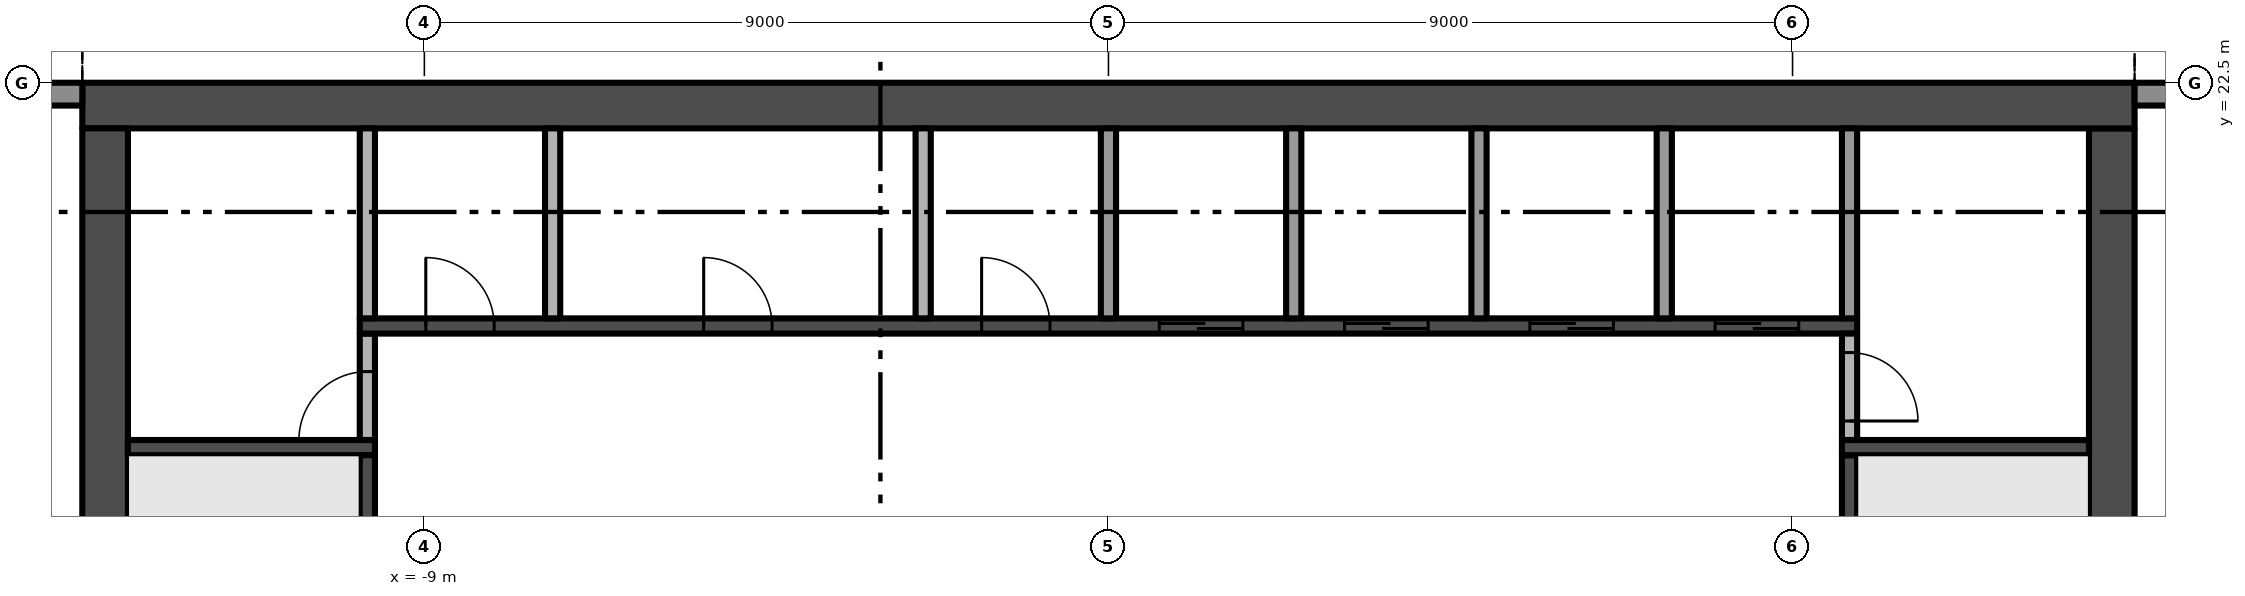
"""IFC4 building model, lengths in metres.
Left out: names, types, materials, properties, quantities, classifications, styles, units other than length and angle.
Written with IfcOpenShell. Run it as: python <this file> out.ifc"""

import sys

from ifc_helpers import new_model, si_unit, direction, frame, frame_2d, origin, place, context, subcontext, project, spatial, polyline, rectangle, outline, extrude, element, fill, save


model = new_model("IFC4")
c1 = context("Model", 3, precision=1e-05, world=origin(), true_north=direction((0.0, 1.0)))
c2 = subcontext(c1, "Body", "Model", "MODEL_VIEW")
j1 = project(units=[si_unit("LENGTHUNIT", "METRE"), si_unit("PLANEANGLEUNIT", "RADIAN")], contexts=[c1])
p1 = place(None, origin())
s1 = spatial("IfcSite", under=j1, at=p1, CompositionType="ELEMENT")
p2 = place(p1, origin())
s2 = spatial("IfcBuilding", under=s1, at=p2, CompositionType="ELEMENT")
p3 = place(p2, frame((0.0, 0.0, 222.4)))
s3 = spatial("IfcBuildingStorey", under=s2, at=p3, CompositionType="ELEMENT", Elevation=222.4)
p4 = place(p3, frame((13.2, 5.1, -0.3), z_axis=(0.0, 0.0, 1.0), x_axis=(0.0, 1.0, 0.0)))
e1 = element("IfcWall", 1, at=p4, inside=s3, PredefinedType="SHEAR", context=c2, shape_type="SweptSolid", body=[
    extrude(rectangle(XDim=16.8, YDim=0.6, at=frame_2d((8.4, 0.0))), origin(), (0.0, 0.0, 1.0), 3.8),
])
p5 = place(p4, frame((6.3, 0.0, 0.3)))
e2 = element("IfcOpeningElement", 2, at=p5, cuts=e1, PredefinedType="OPENING", context=c2, shape_type="SweptSolid", body=[
    extrude(rectangle(XDim=1.2, YDim=2.2, at=frame_2d((0.6, 1.1))), frame((0.0, 0.31, 0.0), z_axis=(0.0, -1.0, 0.0), x_axis=(1.0, 0.0, 0.0)), (0.0, 0.0, 1.0), 0.62),
])
p6 = place(p3, frame((13.5, 22.2, -0.3), z_axis=(0.0, 0.0, 1.0), x_axis=(-1.0, 0.0, 0.0)))
e3 = element("IfcWall", 3, at=p6, inside=s3, PredefinedType="SHEAR", context=c2, shape_type="SweptSolid", body=[
    extrude(rectangle(XDim=27.0, YDim=0.6, at=frame_2d((13.5, 0.0))), origin(), (0.0, 0.0, 1.0), 3.8),
])
p7 = place(p3, frame((-13.2, 21.9, -0.3), z_axis=(0.0, 0.0, 1.0), x_axis=(0.0, -1.0, 0.0)))
e4 = element("IfcWall", 4, at=p7, inside=s3, PredefinedType="SHEAR", context=c2, shape_type="SweptSolid", body=[
    extrude(rectangle(XDim=16.8, YDim=0.6, at=frame_2d((8.4, 0.0))), origin(), (0.0, 0.0, 1.0), 3.8),
])
p8 = place(p7, frame((9.3, 0.0, 0.3)))
e5 = element("IfcOpeningElement", 5, at=p8, cuts=e4, PredefinedType="OPENING", context=c2, shape_type="SweptSolid", body=[
    extrude(rectangle(XDim=1.2, YDim=2.2, at=frame_2d((0.6, 1.1))), frame((0.0, 0.31, 0.0), z_axis=(0.0, -1.0, 0.0), x_axis=(1.0, 0.0, 0.0)), (0.0, 0.0, 1.0), 0.62),
])
p9 = place(p3, frame((13.5, 22.35, 0.0), z_axis=(0.0, 0.0, 1.0), x_axis=(1.0, 0.0, 0.0)))
e6 = element("IfcWall", 6, at=p9, inside=s3, PredefinedType="SOLIDWALL", context=c2, shape_type="SweptSolid", body=[
    extrude(rectangle(XDim=4.025, YDim=0.3, at=frame_2d((2.013, 0.0))), origin(), (0.0, 0.0, 1.0), 3.5),
])
p10 = place(p9, frame((0.625, 0.0, 0.45)))
e7 = element("IfcOpeningElement", 7, at=p10, cuts=e6, PredefinedType="OPENING", context=c2, shape_type="SweptSolid", body=[
    extrude(rectangle(XDim=3.075, YDim=2.65, at=frame_2d((1.538, 1.325))), frame((0.0, 0.16, 0.0), z_axis=(0.0, -1.0, 0.0), x_axis=(1.0, 0.0, 0.0)), (0.0, 0.0, 1.0), 0.32),
])
p11 = place(p3, frame((-17.525, 22.35, 0.0), z_axis=(0.0, 0.0, 1.0), x_axis=(1.0, 0.0, 0.0)))
e8 = element("IfcWall", 8, at=p11, inside=s3, PredefinedType="SOLIDWALL", context=c2, shape_type="SweptSolid", body=[
    extrude(rectangle(XDim=4.025, YDim=0.3, at=frame_2d((2.013, 0.0))), origin(), (0.0, 0.0, 1.0), 3.5),
])
p12 = place(p11, frame((1.0, 0.0, 0.0)))
e9 = element("IfcOpeningElement", 9, at=p12, cuts=e8, PredefinedType="OPENING", context=c2, shape_type="SweptSolid", body=[
    extrude(rectangle(XDim=2.4, YDim=2.4, at=frame_2d((1.2, 1.2))), frame((0.0, 0.16, 0.0), z_axis=(0.0, -1.0, 0.0), x_axis=(1.0, 0.0, 0.0)), (0.0, 0.0, 1.0), 0.32),
])
p13 = place(p3, origin())
e10 = element("IfcWall", 10, at=p13, inside=s3, PredefinedType="USERDEFINED", context=c2, shape_type="SweptSolid", body=[
    extrude(outline(polyline([(22.5, 25.149), (21.0, 24.488), (19.5, 23.755), (18.0, 23.231), (16.875, 23.1), (16.5, 23.115), (15.0, 23.451), (13.5, 24.112), (13.399, 23.883), (14.921, 23.213), (16.467, 22.866), (16.885, 22.849), (18.056, 22.986), (19.596, 23.524), (21.105, 24.261), (22.601, 24.92), (22.5, 25.149)])), origin(), (0.0, 0.0, 1.0), 0.9),
])
p14 = place(p3, origin())
e11 = element("IfcWall", 11, at=p14, inside=s3, PredefinedType="USERDEFINED", context=c2, shape_type="SweptSolid", body=[
    extrude(outline(polyline([(-13.5, 25.149), (-15.0, 24.488), (-16.5, 23.755), (-18.0, 23.231), (-19.125, 23.1), (-19.5, 23.115), (-21.0, 23.451), (-22.5, 24.112), (-22.601, 23.883), (-21.079, 23.213), (-19.533, 22.866), (-19.115, 22.849), (-17.944, 22.986), (-16.404, 23.524), (-14.895, 24.261), (-13.399, 24.92), (-13.5, 25.149)])), origin(), (0.0, 0.0, 1.0), 0.9),
])
p15 = place(p3, frame((-12.9, 17.7, 0.0), z_axis=(0.0, 0.0, 1.0), x_axis=(1.0, 0.0, 0.0)))
e12 = element("IfcWall", 12, at=p15, inside=s3, PredefinedType="SHEAR", context=c2, shape_type="SweptSolid", body=[
    extrude(rectangle(XDim=3.25, YDim=0.2, at=frame_2d((1.625, 0.0))), origin(), (0.0, 0.0, 1.0), 3.5),
])
p16 = place(p3, frame((-9.75, 16.1, 0.0), z_axis=(0.0, 0.0, 1.0), x_axis=(0.0, 1.0, 0.0)))
e13 = element("IfcWall", 13, at=p16, inside=s3, PredefinedType="SHEAR", context=c2, shape_type="SweptSolid", body=[
    extrude(rectangle(XDim=1.5, YDim=0.2, at=frame_2d((0.75, 0.0))), origin(), (0.0, 0.0, 1.0), 3.5),
])
p17 = place(p3, frame((-9.75, 17.8, 0.0), z_axis=(0.0, 0.0, 1.0), x_axis=(0.0, 1.0, 0.0)))
e14 = element("IfcWall", 14, at=p17, inside=s3, PredefinedType="PARTITIONING", context=c2, shape_type="SweptSolid", body=[
    extrude(rectangle(XDim=1.4, YDim=0.2, at=frame_2d((0.7, 0.0))), origin(), (0.0, 0.0, 1.0), 3.5),
])
p18 = place(p17, origin())
e15 = element("IfcOpeningElement", 15, at=p18, cuts=e14, PredefinedType="OPENING", context=c2, shape_type="SweptSolid", body=[
    extrude(rectangle(XDim=0.9, YDim=2.1, at=frame_2d((0.45, 1.05))), frame((0.0, 0.11, 0.0), z_axis=(0.0, -1.0, 0.0), x_axis=(1.0, 0.0, 0.0)), (0.0, 0.0, 1.0), 0.22),
])
p19 = place(p3, frame((-9.85, 19.3, 0.0), z_axis=(0.0, 0.0, 1.0), x_axis=(1.0, 0.0, 0.0)))
e16 = element("IfcWall", 16, at=p19, inside=s3, PredefinedType="SHEAR", context=c2, shape_type="SweptSolid", body=[
    extrude(rectangle(XDim=19.7, YDim=0.2, at=frame_2d((9.85, 0.0))), origin(), (0.0, 0.0, 1.0), 3.5),
])
p20 = place(p19, frame((10.519, 0.0, 0.0)))
e17 = element("IfcOpeningElement", 17, at=p20, cuts=e16, PredefinedType="OPENING", context=c2, shape_type="SweptSolid", body=[
    extrude(rectangle(XDim=1.1, YDim=2.1, at=frame_2d((0.55, 1.05))), frame((0.0, 0.11, 0.0), z_axis=(0.0, -1.0, 0.0), x_axis=(1.0, 0.0, 0.0)), (0.0, 0.0, 1.0), 0.22),
])
p21 = place(p19, frame((12.956, 0.0, 0.0)))
e18 = element("IfcOpeningElement", 18, at=p21, cuts=e16, PredefinedType="OPENING", context=c2, shape_type="SweptSolid", body=[
    extrude(rectangle(XDim=1.1, YDim=2.1, at=frame_2d((0.55, 1.05))), frame((0.0, 0.11, 0.0), z_axis=(0.0, -1.0, 0.0), x_axis=(1.0, 0.0, 0.0)), (0.0, 0.0, 1.0), 0.22),
])
p22 = place(p19, frame((15.394, 0.0, 0.0)))
e19 = element("IfcOpeningElement", 19, at=p22, cuts=e16, PredefinedType="OPENING", context=c2, shape_type="SweptSolid", body=[
    extrude(rectangle(XDim=1.1, YDim=2.1, at=frame_2d((0.55, 1.05))), frame((0.0, 0.11, 0.0), z_axis=(0.0, -1.0, 0.0), x_axis=(1.0, 0.0, 0.0)), (0.0, 0.0, 1.0), 0.22),
])
p23 = place(p19, frame((17.831, 0.0, 0.0)))
e20 = element("IfcOpeningElement", 20, at=p23, cuts=e16, PredefinedType="OPENING", context=c2, shape_type="SweptSolid", body=[
    extrude(rectangle(XDim=1.1, YDim=2.1, at=frame_2d((0.55, 1.05))), frame((0.0, 0.11, 0.0), z_axis=(0.0, -1.0, 0.0), x_axis=(1.0, 0.0, 0.0)), (0.0, 0.0, 1.0), 0.22),
])
p24 = place(p19, frame((0.869, 0.0, 0.0)))
e21 = element("IfcOpeningElement", 21, at=p24, cuts=e16, PredefinedType="OPENING", context=c2, shape_type="SweptSolid", body=[
    extrude(rectangle(XDim=0.9, YDim=2.1, at=frame_2d((0.45, 1.05))), frame((0.0, 0.11, 0.0), z_axis=(0.0, -1.0, 0.0), x_axis=(1.0, 0.0, 0.0)), (0.0, 0.0, 1.0), 0.22),
])
p25 = place(p19, frame((4.525, 0.0, 0.0)))
e22 = element("IfcOpeningElement", 22, at=p25, cuts=e16, PredefinedType="OPENING", context=c2, shape_type="SweptSolid", body=[
    extrude(rectangle(XDim=0.9, YDim=2.1, at=frame_2d((0.45, 1.05))), frame((0.0, 0.11, 0.0), z_axis=(0.0, -1.0, 0.0), x_axis=(1.0, 0.0, 0.0)), (0.0, 0.0, 1.0), 0.22),
])
p26 = place(p19, frame((8.181, 0.0, 0.0)))
e23 = element("IfcOpeningElement", 23, at=p26, cuts=e16, PredefinedType="OPENING", context=c2, shape_type="SweptSolid", body=[
    extrude(rectangle(XDim=0.9, YDim=2.1, at=frame_2d((0.45, 1.05))), frame((0.0, 0.11, 0.0), z_axis=(0.0, -1.0, 0.0), x_axis=(1.0, 0.0, 0.0)), (0.0, 0.0, 1.0), 0.22),
])
for number, where, z_axis, x_axis in (
    (24, (-9.75, 19.4, 0.0), (0.0, 0.0, 1.0), (0.0, 1.0, 0.0)),
    (25, (-7.312, 19.4, 0.0), (0.0, 0.0, 1.0), (0.0, 1.0, 0.0)),
    (26, (-2.438, 19.4, 0.0), (0.0, 0.0, 1.0), (0.0, 1.0, 0.0)),
    (27, (0.0, 19.4, 0.0), (0.0, 0.0, 1.0), (0.0, 1.0, 0.0)),
    (28, (2.438, 19.4, 0.0), (0.0, 0.0, 1.0), (0.0, 1.0, 0.0)),
    (29, (4.875, 19.4, 0.0), (0.0, 0.0, 1.0), (0.0, 1.0, 0.0)),
    (30, (7.312, 19.4, 0.0), (0.0, 0.0, 1.0), (0.0, 1.0, 0.0)),
):
    element("IfcWall", number, at=place(p3, frame(where, z_axis=z_axis, x_axis=x_axis)), inside=s3, PredefinedType="PARTITIONING", context=c2, shape_type="SweptSolid", body=[
        extrude(rectangle(XDim=2.5, YDim=0.2, at=frame_2d((1.25, 0.0))), origin(), (0.0, 0.0, 1.0), 3.5),
    ])
p27 = place(p3, frame((9.75, 16.1, 0.0), z_axis=(0.0, 0.0, 1.0), x_axis=(0.0, 1.0, 0.0)))
e31 = element("IfcWall", 31, at=p27, inside=s3, PredefinedType="SHEAR", context=c2, shape_type="SweptSolid", body=[
    extrude(rectangle(XDim=1.5, YDim=0.2, at=frame_2d((0.75, 0.0))), origin(), (0.0, 0.0, 1.0), 3.5),
])
p28 = place(p3, frame((9.65, 17.7, 0.0), z_axis=(0.0, 0.0, 1.0), x_axis=(1.0, 0.0, 0.0)))
e32 = element("IfcWall", 32, at=p28, inside=s3, PredefinedType="SHEAR", context=c2, shape_type="SweptSolid", body=[
    extrude(rectangle(XDim=3.25, YDim=0.2, at=frame_2d((1.625, 0.0))), origin(), (0.0, 0.0, 1.0), 3.5),
])
p29 = place(p3, frame((9.75, 19.2, 0.0), z_axis=(0.0, 0.0, 1.0), x_axis=(0.0, -1.0, 0.0)))
e33 = element("IfcWall", 33, at=p29, inside=s3, PredefinedType="PARTITIONING", context=c2, shape_type="SweptSolid", body=[
    extrude(rectangle(XDim=1.4, YDim=0.2, at=frame_2d((0.7, 0.0))), origin(), (0.0, 0.0, 1.0), 3.5),
])
p30 = place(p29, frame((0.25, 0.0, 0.0)))
e34 = element("IfcOpeningElement", 34, at=p30, cuts=e33, PredefinedType="OPENING", context=c2, shape_type="SweptSolid", body=[
    extrude(rectangle(XDim=0.9, YDim=2.1, at=frame_2d((0.45, 1.05))), frame((0.0, 0.11, 0.0), z_axis=(0.0, -1.0, 0.0), x_axis=(1.0, 0.0, 0.0)), (0.0, 0.0, 1.0), 0.22),
])
p31 = place(p3, frame((9.75, 19.4, 0.0), z_axis=(0.0, 0.0, 1.0), x_axis=(0.0, 1.0, 0.0)))
e35 = element("IfcWall", 35, at=p31, inside=s3, PredefinedType="PARTITIONING", context=c2, shape_type="SweptSolid", body=[
    extrude(rectangle(XDim=2.5, YDim=0.2, at=frame_2d((1.25, 0.0))), origin(), (0.0, 0.0, 1.0), 3.5),
])
p32 = place(p20, origin())
e36 = element("IfcDoor", 36, at=p32, inside=s3, OperationType="SLIDING_TO_RIGHT", PredefinedType="DOOR", context=c2, shape_type="SweptSolid", body=[
    extrude(rectangle(XDim=1.1, YDim=2.1, at=frame_2d((0.55, 1.05))), frame((0.0, 0.025, 0.0), z_axis=(0.0, -1.0, 0.0), x_axis=(1.0, 0.0, 0.0)), (0.0, 0.0, 1.0), 0.05),
])
fill(e17, e36)
p33 = place(p21, origin())
e37 = element("IfcDoor", 37, at=p33, inside=s3, OperationType="SLIDING_TO_RIGHT", PredefinedType="DOOR", context=c2, shape_type="SweptSolid", body=[
    extrude(rectangle(XDim=1.1, YDim=2.1, at=frame_2d((0.55, 1.05))), frame((0.0, 0.025, 0.0), z_axis=(0.0, -1.0, 0.0), x_axis=(1.0, 0.0, 0.0)), (0.0, 0.0, 1.0), 0.05),
])
fill(e18, e37)
p34 = place(p22, origin())
e38 = element("IfcDoor", 38, at=p34, inside=s3, OperationType="SLIDING_TO_RIGHT", PredefinedType="DOOR", context=c2, shape_type="SweptSolid", body=[
    extrude(rectangle(XDim=1.1, YDim=2.1, at=frame_2d((0.55, 1.05))), frame((0.0, 0.025, 0.0), z_axis=(0.0, -1.0, 0.0), x_axis=(1.0, 0.0, 0.0)), (0.0, 0.0, 1.0), 0.05),
])
fill(e19, e38)
p35 = place(p23, origin())
e39 = element("IfcDoor", 39, at=p35, inside=s3, OperationType="SLIDING_TO_RIGHT", PredefinedType="DOOR", context=c2, shape_type="SweptSolid", body=[
    extrude(rectangle(XDim=1.1, YDim=2.1, at=frame_2d((0.55, 1.05))), frame((0.0, 0.025, 0.0), z_axis=(0.0, -1.0, 0.0), x_axis=(1.0, 0.0, 0.0)), (0.0, 0.0, 1.0), 0.05),
])
fill(e20, e39)
p36 = place(p18, origin())
e40 = element("IfcDoor", 40, at=p36, inside=s3, OperationType="SINGLE_SWING_LEFT", PredefinedType="DOOR", context=c2, shape_type="SweptSolid", body=[
    extrude(rectangle(XDim=0.9, YDim=2.1, at=frame_2d((0.45, 1.05))), frame((0.0, 0.025, 0.0), z_axis=(0.0, -1.0, 0.0), x_axis=(1.0, 0.0, 0.0)), (0.0, 0.0, 1.0), 0.05),
])
fill(e15, e40)
p37 = place(p30, origin())
e41 = element("IfcDoor", 41, at=p37, inside=s3, OperationType="SINGLE_SWING_RIGHT", PredefinedType="DOOR", context=c2, shape_type="SweptSolid", body=[
    extrude(rectangle(XDim=0.9, YDim=2.1, at=frame_2d((0.45, 1.05))), frame((0.0, 0.025, 0.0), z_axis=(0.0, -1.0, 0.0), x_axis=(1.0, 0.0, 0.0)), (0.0, 0.0, 1.0), 0.05),
])
fill(e34, e41)
p38 = place(p24, origin())
e42 = element("IfcDoor", 42, at=p38, inside=s3, OperationType="SINGLE_SWING_LEFT", PredefinedType="DOOR", context=c2, shape_type="SweptSolid", body=[
    extrude(rectangle(XDim=0.9, YDim=2.1, at=frame_2d((0.45, 1.05))), frame((0.0, 0.025, 0.0), z_axis=(0.0, -1.0, 0.0), x_axis=(1.0, 0.0, 0.0)), (0.0, 0.0, 1.0), 0.05),
])
fill(e21, e42)
p39 = place(p25, origin())
e43 = element("IfcDoor", 43, at=p39, inside=s3, OperationType="SINGLE_SWING_LEFT", PredefinedType="DOOR", context=c2, shape_type="SweptSolid", body=[
    extrude(rectangle(XDim=0.9, YDim=2.1, at=frame_2d((0.45, 1.05))), frame((0.0, 0.025, 0.0), z_axis=(0.0, -1.0, 0.0), x_axis=(1.0, 0.0, 0.0)), (0.0, 0.0, 1.0), 0.05),
])
fill(e22, e43)
p40 = place(p26, origin())
e44 = element("IfcDoor", 44, at=p40, inside=s3, OperationType="SINGLE_SWING_LEFT", PredefinedType="DOOR", context=c2, shape_type="SweptSolid", body=[
    extrude(rectangle(XDim=0.9, YDim=2.1, at=frame_2d((0.45, 1.05))), frame((0.0, 0.025, 0.0), z_axis=(0.0, -1.0, 0.0), x_axis=(1.0, 0.0, 0.0)), (0.0, 0.0, 1.0), 0.05),
])
fill(e23, e44)
save(model, sys.argv[1])
